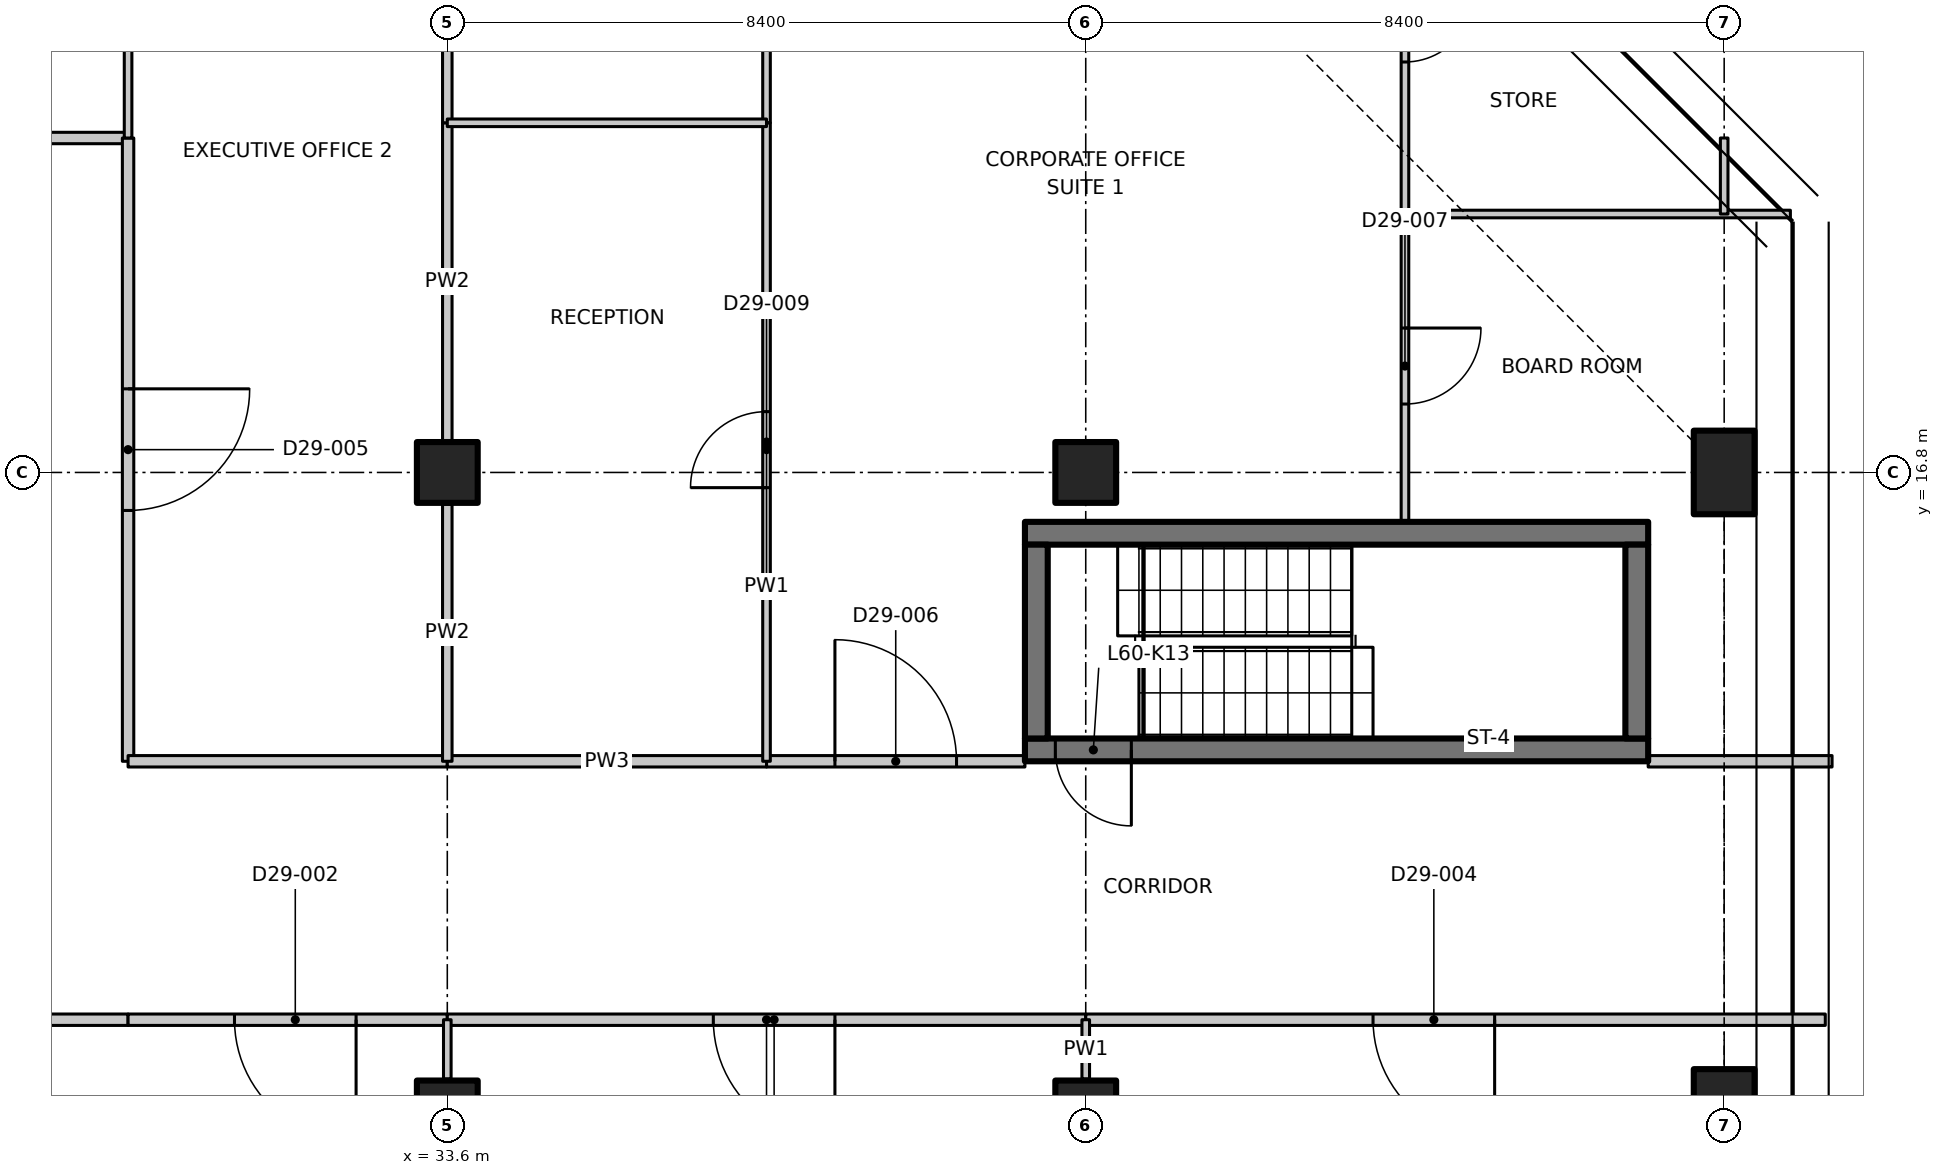
"""IFC4 building model, lengths in metres.
Left out: names, types, materials, properties, quantities, classifications, styles, units other than length and angle.
Written with IfcOpenShell. Run it as: python <this file> out.ifc"""

import sys

from ifc_helpers import new_model, si_unit, direction, frame, frame_2d, origin, origin_2d, place, context, subcontext, project, spatial, polyline, rectangle, outline, extrude, element, fill, save


model = new_model("IFC4")
c1 = context("Model", 3, precision=1e-05, world=origin(), true_north=direction((0.0, 1.0)))
c2 = subcontext(c1, "Body", "Model", "MODEL_VIEW")
j1 = project(units=[si_unit("LENGTHUNIT", "METRE"), si_unit("PLANEANGLEUNIT", "RADIAN")], contexts=[c1])
p1 = place(None, origin())
s1 = spatial("IfcSite", under=j1, at=p1, CompositionType="ELEMENT")
p2 = place(p1, origin())
s2 = spatial("IfcBuilding", under=s1, at=p2, CompositionType="ELEMENT")
p3 = place(p2, frame((0.0, 0.0, 237.3)))
s3 = spatial("IfcBuildingStorey", under=s2, at=p3, CompositionType="ELEMENT", Elevation=237.3)
for number, where, z_axis, x_axis in (
    (1, (33.6, 8.4, 0.0), (0.0, 0.0, 1.0), (1.0, 0.0, 0.0)),
    (2, (33.6, 16.8, 0.0), (0.0, 0.0, 1.0), (1.0, 0.0, 0.0)),
    (3, (42.0, 8.4, 0.0), (0.0, 0.0, 1.0), (1.0, 0.0, 0.0)),
    (4, (42.0, 16.8, 0.0), (0.0, 0.0, 1.0), (1.0, 0.0, 0.0)),
):
    element("IfcColumn", number, at=place(p3, frame(where, z_axis=z_axis, x_axis=x_axis)), inside=s3, PredefinedType="COLUMN", context=c2, shape_type="SweptSolid", body=[
        extrude(rectangle(XDim=0.8, YDim=0.8, at=origin_2d()), origin(), (0.0, 0.0, 1.0), 3.35),
    ])
for number, where, z_axis, x_axis in (
    (5, (50.4, 8.4, 0.0), (0.0, 0.0, 1.0), (1.0, 0.0, 0.0)),
    (6, (50.4, 16.8, 0.0), (0.0, 0.0, 1.0), (1.0, 0.0, 0.0)),
):
    element("IfcColumn", number, at=place(p3, frame(where, z_axis=z_axis, x_axis=x_axis)), inside=s3, PredefinedType="COLUMN", context=c2, shape_type="SweptSolid", body=[
        extrude(rectangle(XDim=0.8, YDim=1.1, at=origin_2d()), origin(), (0.0, 0.0, 1.0), 3.35),
    ])
p4 = place(p3, frame((49.4, 13.15, 0.0), z_axis=(0.0, 0.0, 1.0), x_axis=(-1.0, 0.0, 0.0)))
e7 = element("IfcWall", 7, at=p4, inside=s3, PredefinedType="SHEAR", context=c2, shape_type="SweptSolid", body=[
    extrude(rectangle(XDim=8.2, YDim=0.3, at=frame_2d((4.1, 0.0))), origin(), (0.0, 0.0, 1.0), 3.35),
])
p5 = place(p4, frame((6.8, 0.0, 0.0)))
e8 = element("IfcOpeningElement", 8, at=p5, cuts=e7, PredefinedType="OPENING", context=c2, shape_type="SweptSolid", body=[
    extrude(rectangle(XDim=1.0, YDim=2.1, at=frame_2d((0.5, 1.05))), frame((0.0, 0.16, 0.0), z_axis=(0.0, -1.0, 0.0), x_axis=(1.0, 0.0, 0.0)), (0.0, 0.0, 1.0), 0.32),
])
p6 = place(p3, frame((41.2, 16.0, 0.0), z_axis=(0.0, 0.0, 1.0), x_axis=(1.0, 0.0, 0.0)))
e9 = element("IfcWall", 9, at=p6, inside=s3, PredefinedType="SHEAR", context=c2, shape_type="SweptSolid", body=[
    extrude(rectangle(XDim=8.2, YDim=0.3, at=frame_2d((4.1, 0.0))), origin(), (0.0, 0.0, 1.0), 3.35),
])
for number, where, z_axis, x_axis in (
    (10, (41.35, 13.3, 0.0), (0.0, 0.0, 1.0), (0.0, 1.0, 0.0)),
    (11, (49.25, 13.3, 0.0), (0.0, 0.0, 1.0), (0.0, 1.0, 0.0)),
):
    element("IfcWall", number, at=place(p3, frame(where, z_axis=z_axis, x_axis=x_axis)), inside=s3, PredefinedType="SHEAR", context=c2, shape_type="SweptSolid", body=[
        extrude(rectangle(XDim=2.55, YDim=0.3, at=frame_2d((1.275, 0.0))), origin(), (0.0, 0.0, 1.0), 3.35),
    ])
p7 = place(p3, frame((25.2, 21.2, 0.0), z_axis=(0.0, 0.0, 1.0), x_axis=(1.0, 0.0, 0.0)))
e12 = element("IfcWall", 12, at=p7, inside=s3, PredefinedType="PARTITIONING", context=c2, shape_type="SweptSolid", body=[
    extrude(rectangle(XDim=4.2, YDim=0.15, at=frame_2d((2.1, 0.0))), origin(), (0.0, 0.0, 1.0), 3.33),
])
p8 = place(p7, frame((1.5, 0.0, 0.0)))
e13 = element("IfcOpeningElement", 13, at=p8, cuts=e12, PredefinedType="OPENING", context=c2, shape_type="SweptSolid", body=[
    extrude(rectangle(XDim=1.0, YDim=2.1, at=frame_2d((0.5, 1.05))), frame((0.0, 0.085, 0.0), z_axis=(0.0, -1.0, 0.0), x_axis=(1.0, 0.0, 0.0)), (0.0, 0.0, 1.0), 0.17),
])
p9 = place(p3, frame((29.4, 9.6, 0.0), z_axis=(0.0, 0.0, 1.0), x_axis=(-1.0, 0.0, 0.0)))
e14 = element("IfcWall", 14, at=p9, inside=s3, PredefinedType="PARTITIONING", context=c2, shape_type="SweptSolid", body=[
    extrude(rectangle(XDim=4.2, YDim=0.15, at=frame_2d((2.1, 0.0))), origin(), (0.0, 0.0, 1.0), 3.33),
])
p10 = place(p3, frame((29.4, 21.2, 0.0), z_axis=(0.0, 0.0, 1.0), x_axis=(0.0, -1.0, 0.0)))
e15 = element("IfcWall", 15, at=p10, inside=s3, PredefinedType="PARTITIONING", context=c2, shape_type="SweptSolid", body=[
    extrude(rectangle(XDim=8.2, YDim=0.15, at=frame_2d((4.1, 0.0))), origin(), (0.0, 0.0, 1.0), 3.33),
])
p11 = place(p10, frame((3.3, 0.0, 0.0)))
e16 = element("IfcOpeningElement", 16, at=p11, cuts=e15, PredefinedType="OPENING", context=c2, shape_type="SweptSolid", body=[
    extrude(rectangle(XDim=1.6, YDim=2.1, at=frame_2d((0.8, 1.05))), frame((0.0, 0.085, 0.0), z_axis=(0.0, -1.0, 0.0), x_axis=(1.0, 0.0, 0.0)), (0.0, 0.0, 1.0), 0.17),
])
p12 = place(p3, frame((29.4, 27.429, 0.0), z_axis=(0.0, 0.0, 1.0), x_axis=(0.0, -1.0, 0.0)))
e17 = element("IfcWall", 17, at=p12, inside=s3, PredefinedType="PARTITIONING", context=c2, shape_type="SweptSolid", body=[
    extrude(outline(polyline([(0.0, 0.0), (6.229, 0.0), (6.229, 3.33), (2.679, 3.33), (2.677, 2.98), (1.781, 2.98), (1.779, 3.33), (0.154, 3.33), (0.0, 3.33), (0.0, 0.0)])), frame((0.0, 0.05, 0.0), z_axis=(0.0, -1.0, 0.0), x_axis=(1.0, 0.0, 0.0)), (0.0, 0.0, 1.0), 0.1),
])
p13 = place(p3, frame((33.6, 9.6, 0.0), z_axis=(0.0, 0.0, 1.0), x_axis=(-1.0, 0.0, 0.0)))
e18 = element("IfcWall", 18, at=p13, inside=s3, PredefinedType="PARTITIONING", context=c2, shape_type="SweptSolid", body=[
    extrude(rectangle(XDim=4.2, YDim=0.15, at=frame_2d((2.1, 0.0))), origin(), (0.0, 0.0, 1.0), 3.33),
])
p14 = place(p13, frame((1.2, 0.0, 0.0)))
e19 = element("IfcOpeningElement", 19, at=p14, cuts=e18, PredefinedType="OPENING", context=c2, shape_type="SweptSolid", body=[
    extrude(rectangle(XDim=1.6, YDim=2.1, at=frame_2d((0.8, 1.05))), frame((0.0, 0.085, 0.0), z_axis=(0.0, -1.0, 0.0), x_axis=(1.0, 0.0, 0.0)), (0.0, 0.0, 1.0), 0.17),
])
p15 = place(p3, frame((42.0, 9.6, 0.0), z_axis=(0.0, 0.0, 1.0), x_axis=(-1.0, 0.0, 0.0)))
e20 = element("IfcWall", 20, at=p15, inside=s3, PredefinedType="PARTITIONING", context=c2, shape_type="SweptSolid", body=[
    extrude(rectangle(XDim=8.4, YDim=0.15, at=frame_2d((4.2, 0.0))), origin(), (0.0, 0.0, 1.0), 3.33),
])
p16 = place(p15, frame((3.3, 0.0, 0.0)))
e21 = element("IfcOpeningElement", 21, at=p16, cuts=e20, PredefinedType="OPENING", context=c2, shape_type="SweptSolid", body=[
    extrude(rectangle(XDim=1.6, YDim=2.1, at=frame_2d((0.8, 1.05))), frame((0.0, 0.085, 0.0), z_axis=(0.0, -1.0, 0.0), x_axis=(1.0, 0.0, 0.0)), (0.0, 0.0, 1.0), 0.17),
])
p17 = place(p3, frame((51.73, 9.6, 0.0), z_axis=(0.0, 0.0, 1.0), x_axis=(-1.0, 0.0, 0.0)))
e22 = element("IfcWall", 22, at=p17, inside=s3, PredefinedType="PARTITIONING", context=c2, shape_type="SweptSolid", body=[
    extrude(outline(polyline([(0.0, 0.0), (9.73, 0.0), (9.73, 3.33), (1.781, 3.33), (1.779, 2.98), (0.883, 2.98), (0.881, 3.33), (0.25, 3.33), (0.0, 3.33), (0.0, 0.0)])), frame((0.0, 0.075, 0.0), z_axis=(0.0, -1.0, 0.0), x_axis=(1.0, 0.0, 0.0)), (0.0, 0.0, 1.0), 0.15),
])
p18 = place(p17, frame((4.351, 0.0, 0.0)))
e23 = element("IfcOpeningElement", 23, at=p18, cuts=e22, PredefinedType="OPENING", context=c2, shape_type="SweptSolid", body=[
    extrude(rectangle(XDim=1.6, YDim=2.1, at=frame_2d((0.8, 1.05))), frame((0.0, 0.085, 0.0), z_axis=(0.0, -1.0, 0.0), x_axis=(1.0, 0.0, 0.0)), (0.0, 0.0, 1.0), 0.17),
])
p19 = place(p3, frame((29.4, 13.0, 0.0), z_axis=(0.0, 0.0, 1.0), x_axis=(1.0, 0.0, 0.0)))
e24 = element("IfcWall", 24, at=p19, inside=s3, PredefinedType="PARTITIONING", context=c2, shape_type="SweptSolid", body=[
    extrude(rectangle(XDim=4.2, YDim=0.15, at=frame_2d((2.1, 0.0))), origin(), (0.0, 0.0, 1.0), 3.33),
])
p20 = place(p3, frame((37.8, 13.0, 0.0), z_axis=(0.0, 0.0, 1.0), x_axis=(1.0, 0.0, 0.0)))
e25 = element("IfcWall", 25, at=p20, inside=s3, PredefinedType="PARTITIONING", context=c2, shape_type="SweptSolid", body=[
    extrude(rectangle(XDim=3.4, YDim=0.15, at=frame_2d((1.7, 0.0))), origin(), (0.0, 0.0, 1.0), 3.33),
])
p21 = place(p20, frame((0.9, 0.0, 0.0)))
e26 = element("IfcOpeningElement", 26, at=p21, cuts=e25, PredefinedType="OPENING", context=c2, shape_type="SweptSolid", body=[
    extrude(rectangle(XDim=1.6, YDim=2.1, at=frame_2d((0.8, 1.05))), frame((0.0, 0.085, 0.0), z_axis=(0.0, -1.0, 0.0), x_axis=(1.0, 0.0, 0.0)), (0.0, 0.0, 1.0), 0.17),
])
p22 = place(p3, frame((49.4, 13.0, 0.0), z_axis=(0.0, 0.0, 1.0), x_axis=(1.0, 0.0, 0.0)))
e27 = element("IfcWall", 27, at=p22, inside=s3, PredefinedType="PARTITIONING", context=c2, shape_type="SweptSolid", body=[
    extrude(rectangle(XDim=2.42, YDim=0.15, at=frame_2d((1.21, 0.0))), origin(), (0.0, 0.0, 1.0), 2.98),
])
p23 = place(p3, frame((33.6, 13.0, 0.0), z_axis=(0.0, 0.0, 1.0), x_axis=(1.0, 0.0, 0.0)))
e28 = element("IfcWall", 28, at=p23, inside=s3, PredefinedType="PARTITIONING", context=c2, shape_type="SweptSolid", body=[
    extrude(rectangle(XDim=4.2, YDim=0.15, at=frame_2d((2.1, 0.0))), origin(), (0.0, 0.0, 1.0), 3.33),
])
for number, where, z_axis, x_axis in (
    (29, (33.6, 9.6, 0.0), (0.0, 0.0, 1.0), (0.0, -1.0, 0.0)),
    (30, (42.0, 9.6, 0.0), (0.0, 0.0, 1.0), (0.0, -1.0, 0.0)),
):
    element("IfcWall", number, at=place(p3, frame(where, z_axis=z_axis, x_axis=x_axis)), inside=s3, PredefinedType="PARTITIONING", context=c2, shape_type="SweptSolid", body=[
        extrude(rectangle(XDim=0.78, YDim=0.1, at=frame_2d((0.39, 0.0))), origin(), (0.0, 0.0, 1.0), 3.33),
    ])
p24 = place(p3, frame((33.6, 21.4, 0.0), z_axis=(0.0, 0.0, 1.0), x_axis=(0.0, -1.0, 0.0)))
e31 = element("IfcWall", 31, at=p24, inside=s3, PredefinedType="PARTITIONING", context=c2, shape_type="SweptSolid", body=[
    extrude(rectangle(XDim=4.18, YDim=0.125, at=frame_2d((2.09, 0.0))), origin(), (0.0, 0.0, 1.0), 3.33),
])
p25 = place(p3, frame((33.6, 16.38, 0.0), z_axis=(0.0, 0.0, 1.0), x_axis=(0.0, -1.0, 0.0)))
e32 = element("IfcWall", 32, at=p25, inside=s3, PredefinedType="PARTITIONING", context=c2, shape_type="SweptSolid", body=[
    extrude(rectangle(XDim=3.38, YDim=0.125, at=frame_2d((1.69, 0.0))), origin(), (0.0, 0.0, 1.0), 3.33),
])
p26 = place(p3, frame((33.6, 24.805, 0.0), z_axis=(0.0, 0.0, 1.0), x_axis=(0.0, -1.0, 0.0)))
e33 = element("IfcWall", 33, at=p26, inside=s3, PredefinedType="PARTITIONING", context=c2, shape_type="SweptSolid", body=[
    extrude(rectangle(XDim=3.405, YDim=0.125, at=frame_2d((1.703, 0.0))), origin(), (0.0, 0.0, 1.0), 2.98),
])
p27 = place(p3, frame((46.2, 20.2, 0.0), z_axis=(0.0, 0.0, 1.0), x_axis=(0.0, -1.0, 0.0)))
e34 = element("IfcWall", 34, at=p27, inside=s3, PredefinedType="PARTITIONING", context=c2, shape_type="SweptSolid", body=[
    extrude(rectangle(XDim=4.05, YDim=0.1, at=frame_2d((2.025, 0.0))), origin(), (0.0, 0.0, 1.0), 3.33),
])
p28 = place(p27, frame((1.5, 0.0, 0.0)))
e35 = element("IfcOpeningElement", 35, at=p28, cuts=e34, PredefinedType="OPENING", context=c2, shape_type="SweptSolid", body=[
    extrude(rectangle(XDim=1.0, YDim=2.1, at=frame_2d((0.5, 1.05))), frame((0.0, 0.06, 0.0), z_axis=(0.0, -1.0, 0.0), x_axis=(1.0, 0.0, 0.0)), (0.0, 0.0, 1.0), 0.12),
])
p29 = place(p3, frame((46.2, 25.502, 0.0), z_axis=(0.0, 0.0, 1.0), x_axis=(0.0, -1.0, 0.0)))
e36 = element("IfcWall", 36, at=p29, inside=s3, PredefinedType="PARTITIONING", context=c2, shape_type="SweptSolid", body=[
    extrude(outline(polyline([(0.0, 0.0), (5.302, 0.0), (5.302, 3.33), (5.168, 3.33), (5.166, 2.98), (3.839, 2.98), (3.837, 3.33), (0.103, 3.33), (0.0, 3.33), (0.0, 0.0)])), frame((0.0, 0.05, 0.0), z_axis=(0.0, -1.0, 0.0), x_axis=(1.0, 0.0, 0.0)), (0.0, 0.0, 1.0), 0.1),
])
p30 = place(p29, frame((2.403, 0.0, 0.0)))
e37 = element("IfcOpeningElement", 37, at=p30, cuts=e36, PredefinedType="OPENING", context=c2, shape_type="SweptSolid", body=[
    extrude(rectangle(XDim=0.9, YDim=2.1, at=frame_2d((0.45, 1.05))), frame((0.0, 0.06, 0.0), z_axis=(0.0, -1.0, 0.0), x_axis=(1.0, 0.0, 0.0)), (0.0, 0.0, 1.0), 0.12),
])
p31 = place(p3, frame((37.8, 13.0, 0.0), z_axis=(0.0, 0.0, 1.0), x_axis=(0.0, 1.0, 0.0)))
e38 = element("IfcWall", 38, at=p31, inside=s3, PredefinedType="PARTITIONING", context=c2, shape_type="SweptSolid", body=[
    extrude(rectangle(XDim=8.4, YDim=0.1, at=frame_2d((4.2, 0.0))), origin(), (0.0, 0.0, 1.0), 3.33),
])
p32 = place(p31, frame((3.6, 0.0, 0.0)))
e39 = element("IfcOpeningElement", 39, at=p32, cuts=e38, PredefinedType="OPENING", context=c2, shape_type="SweptSolid", body=[
    extrude(rectangle(XDim=1.0, YDim=2.1, at=frame_2d((0.5, 1.05))), frame((0.0, 0.06, 0.0), z_axis=(0.0, -1.0, 0.0), x_axis=(1.0, 0.0, 0.0)), (0.0, 0.0, 1.0), 0.12),
])
p33 = place(p3, frame((37.8, 21.4, 0.0), z_axis=(0.0, 0.0, 1.0), x_axis=(0.0, 1.0, 0.0)))
e40 = element("IfcWall", 40, at=p33, inside=s3, PredefinedType="PARTITIONING", context=c2, shape_type="SweptSolid", body=[
    extrude(outline(polyline([(0.0, 0.0), (8.843, 0.0), (8.843, 3.33), (4.25, 3.33), (4.248, 2.98), (3.352, 2.98), (3.35, 3.33), (0.0, 3.33), (0.0, 0.0)])), frame((0.0, 0.05, 0.0), z_axis=(0.0, -1.0, 0.0), x_axis=(1.0, 0.0, 0.0)), (0.0, 0.0, 1.0), 0.1),
])
p34 = place(p33, frame((3.9, 0.0, 0.0)))
e41 = element("IfcOpeningElement", 41, at=p34, cuts=e40, PredefinedType="OPENING", context=c2, shape_type="SweptSolid", body=[
    extrude(rectangle(XDim=1.0, YDim=2.1, at=frame_2d((0.5, 1.05))), frame((0.0, 0.06, 0.0), z_axis=(0.0, -1.0, 0.0), x_axis=(1.0, 0.0, 0.0)), (0.0, 0.0, 1.0), 0.12),
])
p35 = place(p3, frame((46.2, 20.2, 0.0), z_axis=(0.0, 0.0, 1.0), x_axis=(1.0, 0.0, 0.0)))
e42 = element("IfcWall", 42, at=p35, inside=s3, PredefinedType="PARTITIONING", context=c2, shape_type="SweptSolid", body=[
    extrude(rectangle(XDim=5.071, YDim=0.1, at=frame_2d((2.536, 0.0))), origin(), (0.0, 0.0, 1.0), 2.98),
])
p36 = place(p3, frame((50.4, 20.2, 0.0), z_axis=(0.0, 0.0, 1.0), x_axis=(0.0, 1.0, 0.0)))
e43 = element("IfcWall", 43, at=p36, inside=s3, PredefinedType="PARTITIONING", context=c2, shape_type="SweptSolid", body=[
    extrude(rectangle(XDim=1.0, YDim=0.1, at=frame_2d((0.5, 0.0))), origin(), (0.0, 0.0, 1.0), 3.33),
])
p37 = place(p3, frame((33.6, 21.4, 0.0), z_axis=(0.0, 0.0, 1.0), x_axis=(1.0, 0.0, 0.0)))
e44 = element("IfcWall", 44, at=p37, inside=s3, PredefinedType="PARTITIONING", context=c2, shape_type="SweptSolid", body=[
    extrude(rectangle(XDim=4.2, YDim=0.1, at=frame_2d((2.1, 0.0))), origin(), (0.0, 0.0, 1.0), 3.33),
])
p38 = place(p5, origin())
e45 = element("IfcDoor", 45, at=p38, inside=s3, OperationType="SINGLE_SWING_RIGHT", PredefinedType="DOOR", context=c2, shape_type="SweptSolid", body=[
    extrude(rectangle(XDim=1.0, YDim=2.1, at=frame_2d((0.5, 1.05))), frame((0.0, 0.025, 0.0), z_axis=(0.0, -1.0, 0.0), x_axis=(1.0, 0.0, 0.0)), (0.0, 0.0, 1.0), 0.05),
])
fill(e8, e45)
p39 = place(p14, origin())
e46 = element("IfcDoor", 46, at=p39, inside=s3, OperationType="DOUBLE_DOOR_SINGLE_SWING", PredefinedType="DOOR", context=c2, shape_type="SweptSolid", body=[
    extrude(rectangle(XDim=1.6, YDim=2.1, at=frame_2d((0.8, 1.05))), frame((0.0, 0.025, 0.0), z_axis=(0.0, -1.0, 0.0), x_axis=(1.0, 0.0, 0.0)), (0.0, 0.0, 1.0), 0.05),
])
fill(e19, e46)
p40 = place(p16, origin())
e47 = element("IfcDoor", 47, at=p40, inside=s3, OperationType="DOUBLE_DOOR_SINGLE_SWING", PredefinedType="DOOR", context=c2, shape_type="SweptSolid", body=[
    extrude(rectangle(XDim=1.6, YDim=2.1, at=frame_2d((0.8, 1.05))), frame((0.0, 0.025, 0.0), z_axis=(0.0, -1.0, 0.0), x_axis=(1.0, 0.0, 0.0)), (0.0, 0.0, 1.0), 0.05),
])
fill(e21, e47)
p41 = place(p18, origin())
e48 = element("IfcDoor", 48, at=p41, inside=s3, OperationType="DOUBLE_DOOR_SINGLE_SWING", PredefinedType="DOOR", context=c2, shape_type="SweptSolid", body=[
    extrude(rectangle(XDim=1.6, YDim=2.1, at=frame_2d((0.8, 1.05))), frame((0.0, 0.025, 0.0), z_axis=(0.0, -1.0, 0.0), x_axis=(1.0, 0.0, 0.0)), (0.0, 0.0, 1.0), 0.05),
])
fill(e23, e48)
p42 = place(p11, origin())
e49 = element("IfcDoor", 49, at=p42, inside=s3, OperationType="DOUBLE_DOOR_SINGLE_SWING", PredefinedType="DOOR", context=c2, shape_type="SweptSolid", body=[
    extrude(rectangle(XDim=1.6, YDim=2.1, at=frame_2d((0.8, 1.05))), frame((0.0, 0.025, 0.0), z_axis=(0.0, -1.0, 0.0), x_axis=(1.0, 0.0, 0.0)), (0.0, 0.0, 1.0), 0.05),
])
fill(e16, e49)
p43 = place(p21, origin())
e50 = element("IfcDoor", 50, at=p43, inside=s3, OperationType="DOUBLE_DOOR_SINGLE_SWING", PredefinedType="DOOR", context=c2, shape_type="SweptSolid", body=[
    extrude(rectangle(XDim=1.6, YDim=2.1, at=frame_2d((0.8, 1.05))), frame((0.0, 0.025, 0.0), z_axis=(0.0, -1.0, 0.0), x_axis=(1.0, 0.0, 0.0)), (0.0, 0.0, 1.0), 0.05),
])
fill(e26, e50)
p44 = place(p28, origin())
e51 = element("IfcDoor", 51, at=p44, inside=s3, OperationType="SINGLE_SWING_LEFT", PredefinedType="DOOR", context=c2, shape_type="SweptSolid", body=[
    extrude(rectangle(XDim=1.0, YDim=2.1, at=frame_2d((0.5, 1.05))), frame((0.0, 0.025, 0.0), z_axis=(0.0, -1.0, 0.0), x_axis=(1.0, 0.0, 0.0)), (0.0, 0.0, 1.0), 0.05),
])
fill(e35, e51)
p45 = place(p30, origin())
e52 = element("IfcDoor", 52, at=p45, inside=s3, OperationType="SINGLE_SWING_LEFT", PredefinedType="DOOR", context=c2, shape_type="SweptSolid", body=[
    extrude(rectangle(XDim=0.9, YDim=2.1, at=frame_2d((0.45, 1.05))), frame((0.0, 0.025, 0.0), z_axis=(0.0, -1.0, 0.0), x_axis=(1.0, 0.0, 0.0)), (0.0, 0.0, 1.0), 0.05),
])
fill(e37, e52)
p46 = place(p32, origin())
e53 = element("IfcDoor", 53, at=p46, inside=s3, OperationType="SINGLE_SWING_LEFT", PredefinedType="DOOR", context=c2, shape_type="SweptSolid", body=[
    extrude(rectangle(XDim=1.0, YDim=2.1, at=frame_2d((0.5, 1.05))), frame((0.0, 0.025, 0.0), z_axis=(0.0, -1.0, 0.0), x_axis=(1.0, 0.0, 0.0)), (0.0, 0.0, 1.0), 0.05),
])
fill(e39, e53)
save(model, sys.argv[1])
